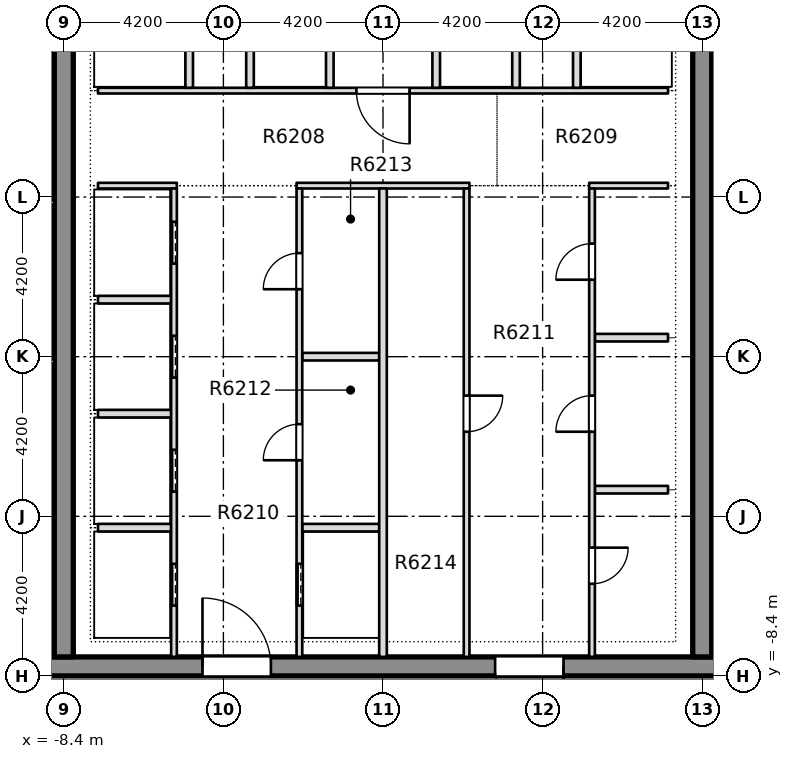
"""IFC4 building model, lengths in metres.
Left out: names, types, materials, properties, quantities, classifications, styles, units other than length and angle.
Written with IfcOpenShell. Run it as: python <this file> out.ifc"""

import sys

from ifc_helpers import new_model, si_unit, direction, frame, frame_2d, origin, place, context, subcontext, project, spatial, rectangle, extrude, element, fill, save


model = new_model("IFC4")
c1 = context("Model", 3, precision=1e-05, world=origin(), true_north=direction((0.0, 1.0)))
c2 = subcontext(c1, "Body", "Model", "MODEL_VIEW")
j1 = project(units=[si_unit("LENGTHUNIT", "METRE"), si_unit("PLANEANGLEUNIT", "RADIAN")], contexts=[c1])
p1 = place(None, origin())
s1 = spatial("IfcSite", under=j1, at=p1, CompositionType="ELEMENT")
p2 = place(p1, origin())
s2 = spatial("IfcBuilding", under=s1, at=p2, CompositionType="ELEMENT")
p3 = place(p2, frame((0.0, 0.0, 237.25)))
s3 = spatial("IfcBuildingStorey", under=s2, at=p3, CompositionType="ELEMENT", Elevation=237.25)
p4 = place(p3, frame((-12.1, -8.15, -0.4), z_axis=(0.0, 0.0, 1.0), x_axis=(1.0, 0.0, 0.0)))
e1 = element("IfcWall", 1, at=p4, inside=s3, PredefinedType="SHEAR", context=c2, shape_type="SweptSolid", body=[
    extrude(rectangle(XDim=24.2, YDim=0.5, at=frame_2d((12.1, 0.0))), origin(), (0.0, 0.0, 1.0), 3.45),
])
p5 = place(p4, frame((7.35, 0.0, 0.4)))
e2 = element("IfcOpeningElement", 2, at=p5, cuts=e1, PredefinedType="OPENING", context=c2, shape_type="SweptSolid", body=[
    extrude(rectangle(XDim=1.8, YDim=2.1, at=frame_2d((0.9, 1.05))), frame((0.0, 0.26, 0.0), z_axis=(0.0, -1.0, 0.0), x_axis=(1.0, 0.0, 0.0)), (0.0, 0.0, 1.0), 0.52),
])
p6 = place(p4, frame((15.05, 0.0, 0.4)))
e3 = element("IfcOpeningElement", 3, at=p6, cuts=e1, PredefinedType="OPENING", context=c2, shape_type="SweptSolid", body=[
    extrude(rectangle(XDim=1.8, YDim=2.1, at=frame_2d((0.9, 1.05))), frame((0.0, 0.26, 0.0), z_axis=(0.0, -1.0, 0.0), x_axis=(1.0, 0.0, 0.0)), (0.0, 0.0, 1.0), 0.52),
])
p7 = place(p3, frame((-8.4, -7.9, -0.4), z_axis=(0.0, 0.0, 1.0), x_axis=(0.0, 1.0, 0.0)))
e4 = element("IfcWall", 4, at=p7, inside=s3, PredefinedType="SHEAR", context=c2, shape_type="SweptSolid", body=[
    extrude(rectangle(XDim=29.15, YDim=0.5, at=frame_2d((14.575, 0.0))), origin(), (0.0, 0.0, 1.0), 3.45),
])
p8 = place(p7, frame((18.8, 0.0, 0.4)))
e5 = element("IfcOpeningElement", 5, at=p8, cuts=e4, PredefinedType="OPENING", context=c2, shape_type="SweptSolid", body=[
    extrude(rectangle(XDim=1.2, YDim=2.1, at=frame_2d((0.6, 1.05))), frame((0.0, 0.26, 0.0), z_axis=(0.0, -1.0, 0.0), x_axis=(1.0, 0.0, 0.0)), (0.0, 0.0, 1.0), 0.52),
])
p9 = place(p3, frame((8.4, -7.9, -0.4), z_axis=(0.0, 0.0, 1.0), x_axis=(0.0, 1.0, 0.0)))
e6 = element("IfcWall", 6, at=p9, inside=s3, PredefinedType="SHEAR", context=c2, shape_type="SweptSolid", body=[
    extrude(rectangle(XDim=29.15, YDim=0.5, at=frame_2d((14.575, 0.0))), origin(), (0.0, 0.0, 1.0), 3.45),
])
p10 = place(p9, frame((18.8, 0.0, 0.4)))
e7 = element("IfcOpeningElement", 7, at=p10, cuts=e6, PredefinedType="OPENING", context=c2, shape_type="SweptSolid", body=[
    extrude(rectangle(XDim=1.2, YDim=2.1, at=frame_2d((0.6, 1.05))), frame((0.0, 0.26, 0.0), z_axis=(0.0, -1.0, 0.0), x_axis=(1.0, 0.0, 0.0)), (0.0, 0.0, 1.0), 0.52),
])
p11 = place(p3, frame((-7.5, -4.5, 0.0), z_axis=(0.0, 0.0, 1.0), x_axis=(1.0, 0.0, 0.0)))
e8 = element("IfcWall", 8, at=p11, inside=s3, PredefinedType="PARTITIONING", context=c2, shape_type="SweptSolid", body=[
    extrude(rectangle(XDim=1.925, YDim=0.2, at=frame_2d((0.962, 0.0))), origin(), (0.0, 0.0, 1.0), 3.05),
])
p12 = place(p3, frame((-2.125, -4.5, 0.0), z_axis=(0.0, 0.0, 1.0), x_axis=(1.0, 0.0, 0.0)))
e9 = element("IfcWall", 9, at=p12, inside=s3, PredefinedType="PARTITIONING", context=c2, shape_type="SweptSolid", body=[
    extrude(rectangle(XDim=2.025, YDim=0.2, at=frame_2d((1.012, 0.0))), origin(), (0.0, 0.0, 1.0), 3.05),
])
for number, where, z_axis, x_axis in (
    (10, (5.575, -3.5, 0.0), (0.0, 0.0, 1.0), (1.0, 0.0, 0.0)),
    (11, (-7.5, -1.5, 0.0), (0.0, 0.0, 1.0), (1.0, 0.0, 0.0)),
):
    element("IfcWall", number, at=place(p3, frame(where, z_axis=z_axis, x_axis=x_axis)), inside=s3, PredefinedType="PARTITIONING", context=c2, shape_type="SweptSolid", body=[
        extrude(rectangle(XDim=1.925, YDim=0.2, at=frame_2d((0.962, 0.0))), origin(), (0.0, 0.0, 1.0), 3.05),
    ])
p13 = place(p3, frame((-2.125, 0.0, 0.0), z_axis=(0.0, 0.0, 1.0), x_axis=(1.0, 0.0, 0.0)))
e12 = element("IfcWall", 12, at=p13, inside=s3, PredefinedType="PARTITIONING", context=c2, shape_type="SweptSolid", body=[
    extrude(rectangle(XDim=2.025, YDim=0.2, at=frame_2d((1.012, 0.0))), origin(), (0.0, 0.0, 1.0), 3.05),
])
for number, where, z_axis, x_axis in (
    (13, (5.575, 0.5, 0.0), (0.0, 0.0, 1.0), (1.0, 0.0, 0.0)),
    (14, (-7.5, 1.5, 0.0), (0.0, 0.0, 1.0), (1.0, 0.0, 0.0)),
):
    element("IfcWall", number, at=place(p3, frame(where, z_axis=z_axis, x_axis=x_axis)), inside=s3, PredefinedType="PARTITIONING", context=c2, shape_type="SweptSolid", body=[
        extrude(rectangle(XDim=1.925, YDim=0.2, at=frame_2d((0.962, 0.0))), origin(), (0.0, 0.0, 1.0), 3.05),
    ])
p14 = place(p3, frame((-7.5, 4.5, 0.0), z_axis=(0.0, 0.0, 1.0), x_axis=(1.0, 0.0, 0.0)))
e15 = element("IfcWall", 15, at=p14, inside=s3, PredefinedType="PARTITIONING", context=c2, shape_type="SweptSolid", body=[
    extrude(rectangle(XDim=2.075, YDim=0.15, at=frame_2d((1.038, 0.0))), origin(), (0.0, 0.0, 1.0), 3.05),
])
p15 = place(p3, frame((-2.275, 4.5, 0.0), z_axis=(0.0, 0.0, 1.0), x_axis=(1.0, 0.0, 0.0)))
e16 = element("IfcWall", 16, at=p15, inside=s3, PredefinedType="PARTITIONING", context=c2, shape_type="SweptSolid", body=[
    extrude(rectangle(XDim=4.55, YDim=0.15, at=frame_2d((2.275, 0.0))), origin(), (0.0, 0.0, 1.0), 3.05),
])
p16 = place(p3, frame((5.425, 4.5, 0.0), z_axis=(0.0, 0.0, 1.0), x_axis=(1.0, 0.0, 0.0)))
e17 = element("IfcWall", 17, at=p16, inside=s3, PredefinedType="PARTITIONING", context=c2, shape_type="SweptSolid", body=[
    extrude(rectangle(XDim=2.075, YDim=0.15, at=frame_2d((1.038, 0.0))), origin(), (0.0, 0.0, 1.0), 3.05),
])
p17 = place(p3, frame((-7.5, 7.0, 0.0), z_axis=(0.0, 0.0, 1.0), x_axis=(1.0, 0.0, 0.0)))
e18 = element("IfcWall", 18, at=p17, inside=s3, PredefinedType="PARTITIONING", context=c2, shape_type="SweptSolid", body=[
    extrude(rectangle(XDim=15.0, YDim=0.15, at=frame_2d((7.5, 0.0))), origin(), (0.0, 0.0, 1.0), 3.05),
])
p18 = place(p17, frame((6.8, 0.0, 0.0)))
e19 = element("IfcOpeningElement", 19, at=p18, cuts=e18, PredefinedType="OPENING", context=c2, shape_type="SweptSolid", body=[
    extrude(rectangle(XDim=1.4, YDim=2.1, at=frame_2d((0.7, 1.05))), frame((0.0, 0.085, 0.0), z_axis=(0.0, -1.0, 0.0), x_axis=(1.0, 0.0, 0.0)), (0.0, 0.0, 1.0), 0.17),
])
p19 = place(p3, frame((-5.5, -7.899, 0.0), z_axis=(0.0, 0.0, 1.0), x_axis=(0.0, 1.0, 0.0)))
e20 = element("IfcWall", 20, at=p19, inside=s3, PredefinedType="PARTITIONING", context=c2, shape_type="SweptSolid", body=[
    extrude(rectangle(XDim=12.324, YDim=0.15, at=frame_2d((6.162, 0.0))), origin(), (0.0, 0.0, 1.0), 3.05),
])
p20 = place(p19, frame((1.349, 0.0, 0.0)))
e21 = element("IfcOpeningElement", 21, at=p20, cuts=e20, PredefinedType="OPENING", context=c2, shape_type="SweptSolid", body=[
    extrude(rectangle(XDim=1.1, YDim=2.1, at=frame_2d((0.55, 1.05))), frame((0.0, 0.085, 0.0), z_axis=(0.0, -1.0, 0.0), x_axis=(1.0, 0.0, 0.0)), (0.0, 0.0, 1.0), 0.17),
])
p21 = place(p19, frame((4.349, 0.0, 0.0)))
e22 = element("IfcOpeningElement", 22, at=p21, cuts=e20, PredefinedType="OPENING", context=c2, shape_type="SweptSolid", body=[
    extrude(rectangle(XDim=1.1, YDim=2.1, at=frame_2d((0.55, 1.05))), frame((0.0, 0.085, 0.0), z_axis=(0.0, -1.0, 0.0), x_axis=(1.0, 0.0, 0.0)), (0.0, 0.0, 1.0), 0.17),
])
p22 = place(p19, frame((7.349, 0.0, 0.0)))
e23 = element("IfcOpeningElement", 23, at=p22, cuts=e20, PredefinedType="OPENING", context=c2, shape_type="SweptSolid", body=[
    extrude(rectangle(XDim=1.1, YDim=2.1, at=frame_2d((0.55, 1.05))), frame((0.0, 0.085, 0.0), z_axis=(0.0, -1.0, 0.0), x_axis=(1.0, 0.0, 0.0)), (0.0, 0.0, 1.0), 0.17),
])
p23 = place(p19, frame((10.349, 0.0, 0.0)))
e24 = element("IfcOpeningElement", 24, at=p23, cuts=e20, PredefinedType="OPENING", context=c2, shape_type="SweptSolid", body=[
    extrude(rectangle(XDim=1.1, YDim=2.1, at=frame_2d((0.55, 1.05))), frame((0.0, 0.085, 0.0), z_axis=(0.0, -1.0, 0.0), x_axis=(1.0, 0.0, 0.0)), (0.0, 0.0, 1.0), 0.17),
])
p24 = place(p3, frame((-5.1, 7.075, 0.0), z_axis=(0.0, 0.0, 1.0), x_axis=(0.0, 1.0, 0.0)))
e25 = element("IfcWall", 25, at=p24, inside=s3, PredefinedType="PARTITIONING", context=c2, shape_type="SweptSolid", body=[
    extrude(rectangle(XDim=2.725, YDim=0.2, at=frame_2d((1.363, 0.0))), origin(), (0.0, 0.0, 1.0), 3.05),
])
p25 = place(p3, frame((-3.5, 7.075, 0.0), z_axis=(0.0, 0.0, 1.0), x_axis=(0.0, 1.0, 0.0)))
e26 = element("IfcWall", 26, at=p25, inside=s3, PredefinedType="PARTITIONING", context=c2, shape_type="SweptSolid", body=[
    extrude(rectangle(XDim=2.85, YDim=0.2, at=frame_2d((1.425, 0.0))), origin(), (0.0, 0.0, 1.0), 3.05),
])
p26 = place(p3, frame((-2.2, -7.899, 0.0), z_axis=(0.0, 0.0, 1.0), x_axis=(0.0, 1.0, 0.0)))
e27 = element("IfcWall", 27, at=p26, inside=s3, PredefinedType="PARTITIONING", context=c2, shape_type="SweptSolid", body=[
    extrude(rectangle(XDim=12.324, YDim=0.15, at=frame_2d((6.162, 0.0))), origin(), (0.0, 0.0, 1.0), 3.05),
])
p27 = place(p26, frame((1.349, 0.0, 0.0)))
e28 = element("IfcOpeningElement", 28, at=p27, cuts=e27, PredefinedType="OPENING", context=c2, shape_type="SweptSolid", body=[
    extrude(rectangle(XDim=1.1, YDim=2.1, at=frame_2d((0.55, 1.05))), frame((0.0, 0.085, 0.0), z_axis=(0.0, -1.0, 0.0), x_axis=(1.0, 0.0, 0.0)), (0.0, 0.0, 1.0), 0.17),
])
p28 = place(p26, frame((5.174, 0.0, 0.0)))
e29 = element("IfcOpeningElement", 29, at=p28, cuts=e27, PredefinedType="OPENING", context=c2, shape_type="SweptSolid", body=[
    extrude(rectangle(XDim=0.95, YDim=2.1, at=frame_2d((0.475, 1.05))), frame((0.0, 0.085, 0.0), z_axis=(0.0, -1.0, 0.0), x_axis=(1.0, 0.0, 0.0)), (0.0, 0.0, 1.0), 0.17),
])
p29 = place(p26, frame((9.674, 0.0, 0.0)))
e30 = element("IfcOpeningElement", 30, at=p29, cuts=e27, PredefinedType="OPENING", context=c2, shape_type="SweptSolid", body=[
    extrude(rectangle(XDim=0.95, YDim=2.1, at=frame_2d((0.475, 1.05))), frame((0.0, 0.085, 0.0), z_axis=(0.0, -1.0, 0.0), x_axis=(1.0, 0.0, 0.0)), (0.0, 0.0, 1.0), 0.17),
])
p30 = place(p3, frame((-1.4, 7.075, 0.0), z_axis=(0.0, 0.0, 1.0), x_axis=(0.0, 1.0, 0.0)))
e31 = element("IfcWall", 31, at=p30, inside=s3, PredefinedType="PARTITIONING", context=c2, shape_type="SweptSolid", body=[
    extrude(rectangle(XDim=2.85, YDim=0.2, at=frame_2d((1.425, 0.0))), origin(), (0.0, 0.0, 1.0), 3.05),
])
p31 = place(p3, frame((0.0, -7.899, 0.0), z_axis=(0.0, 0.0, 1.0), x_axis=(0.0, 1.0, 0.0)))
e32 = element("IfcWall", 32, at=p31, inside=s3, PredefinedType="PARTITIONING", context=c2, shape_type="SweptSolid", body=[
    extrude(rectangle(XDim=12.324, YDim=0.2, at=frame_2d((6.162, 0.0))), origin(), (0.0, 0.0, 1.0), 3.05),
])
p32 = place(p3, frame((1.4, 7.075, 0.0), z_axis=(0.0, 0.0, 1.0), x_axis=(0.0, 1.0, 0.0)))
e33 = element("IfcWall", 33, at=p32, inside=s3, PredefinedType="PARTITIONING", context=c2, shape_type="SweptSolid", body=[
    extrude(rectangle(XDim=2.85, YDim=0.2, at=frame_2d((1.425, 0.0))), origin(), (0.0, 0.0, 1.0), 3.05),
])
p33 = place(p3, frame((2.2, -7.899, 0.0), z_axis=(0.0, 0.0, 1.0), x_axis=(0.0, 1.0, 0.0)))
e34 = element("IfcWall", 34, at=p33, inside=s3, PredefinedType="PARTITIONING", context=c2, shape_type="SweptSolid", body=[
    extrude(rectangle(XDim=12.324, YDim=0.15, at=frame_2d((6.162, 0.0))), origin(), (0.0, 0.0, 1.0), 3.05),
])
p34 = place(p33, frame((5.924, 0.0, 0.0)))
e35 = element("IfcOpeningElement", 35, at=p34, cuts=e34, PredefinedType="OPENING", context=c2, shape_type="SweptSolid", body=[
    extrude(rectangle(XDim=0.95, YDim=2.1, at=frame_2d((0.475, 1.05))), frame((0.0, 0.085, 0.0), z_axis=(0.0, -1.0, 0.0), x_axis=(1.0, 0.0, 0.0)), (0.0, 0.0, 1.0), 0.17),
])
p35 = place(p3, frame((3.5, 7.075, 0.0), z_axis=(0.0, 0.0, 1.0), x_axis=(0.0, 1.0, 0.0)))
e36 = element("IfcWall", 36, at=p35, inside=s3, PredefinedType="PARTITIONING", context=c2, shape_type="SweptSolid", body=[
    extrude(rectangle(XDim=2.85, YDim=0.2, at=frame_2d((1.425, 0.0))), origin(), (0.0, 0.0, 1.0), 3.05),
])
p36 = place(p3, frame((5.1, 7.075, 0.0), z_axis=(0.0, 0.0, 1.0), x_axis=(0.0, 1.0, 0.0)))
e37 = element("IfcWall", 37, at=p36, inside=s3, PredefinedType="PARTITIONING", context=c2, shape_type="SweptSolid", body=[
    extrude(rectangle(XDim=2.725, YDim=0.2, at=frame_2d((1.363, 0.0))), origin(), (0.0, 0.0, 1.0), 3.05),
])
p37 = place(p3, frame((5.5, -7.899, 0.0), z_axis=(0.0, 0.0, 1.0), x_axis=(0.0, 1.0, 0.0)))
e38 = element("IfcWall", 38, at=p37, inside=s3, PredefinedType="PARTITIONING", context=c2, shape_type="SweptSolid", body=[
    extrude(rectangle(XDim=12.324, YDim=0.15, at=frame_2d((6.162, 0.0))), origin(), (0.0, 0.0, 1.0), 3.05),
])
p38 = place(p37, frame((1.924, 0.0, 0.0)))
e39 = element("IfcOpeningElement", 39, at=p38, cuts=e38, PredefinedType="OPENING", context=c2, shape_type="SweptSolid", body=[
    extrude(rectangle(XDim=0.95, YDim=2.1, at=frame_2d((0.475, 1.05))), frame((0.0, 0.085, 0.0), z_axis=(0.0, -1.0, 0.0), x_axis=(1.0, 0.0, 0.0)), (0.0, 0.0, 1.0), 0.17),
])
p39 = place(p37, frame((5.924, 0.0, 0.0)))
e40 = element("IfcOpeningElement", 40, at=p39, cuts=e38, PredefinedType="OPENING", context=c2, shape_type="SweptSolid", body=[
    extrude(rectangle(XDim=0.95, YDim=2.1, at=frame_2d((0.475, 1.05))), frame((0.0, 0.085, 0.0), z_axis=(0.0, -1.0, 0.0), x_axis=(1.0, 0.0, 0.0)), (0.0, 0.0, 1.0), 0.17),
])
p40 = place(p37, frame((9.924, 0.0, 0.0)))
e41 = element("IfcOpeningElement", 41, at=p40, cuts=e38, PredefinedType="OPENING", context=c2, shape_type="SweptSolid", body=[
    extrude(rectangle(XDim=0.95, YDim=2.1, at=frame_2d((0.475, 1.05))), frame((0.0, 0.085, 0.0), z_axis=(0.0, -1.0, 0.0), x_axis=(1.0, 0.0, 0.0)), (0.0, 0.0, 1.0), 0.17),
])
for number, where, z_axis, x_axis in (
    (42, (-12.099, -0.125, 0.0), (0.0, 0.0, 1.0), (1.0, 0.0, 0.0)),
    (43, (-12.099, 4.054, 0.0), (0.0, 0.0, 1.0), (1.0, 0.0, 0.0)),
):
    element("IfcWall", number, at=place(p3, frame(where, z_axis=z_axis, x_axis=x_axis)), inside=s3, PredefinedType="PARTITIONING", context=c2, shape_type="SweptSolid", body=[
        extrude(rectangle(XDim=3.448, YDim=0.1, at=frame_2d((1.724, 0.0))), origin(), (0.0, 0.0, 1.0), 3.05),
    ])
p41 = place(p3, frame((8.651, 1.225, 0.0), z_axis=(0.0, 0.0, 1.0), x_axis=(1.0, 0.0, 0.0)))
e44 = element("IfcWall", 44, at=p41, inside=s3, PredefinedType="PARTITIONING", context=c2, shape_type="SweptSolid", body=[
    extrude(rectangle(XDim=3.448, YDim=0.2, at=frame_2d((1.724, 0.0))), origin(), (0.0, 0.0, 1.0), 3.05),
])
p42 = place(p20, origin())
e45 = element("IfcDoor", 45, at=p42, inside=s3, OperationType="SLIDING_TO_LEFT", PredefinedType="DOOR", context=c2, shape_type="SweptSolid", body=[
    extrude(rectangle(XDim=1.1, YDim=2.1, at=frame_2d((0.55, 1.05))), frame((0.0, 0.025, 0.0), z_axis=(0.0, -1.0, 0.0), x_axis=(1.0, 0.0, 0.0)), (0.0, 0.0, 1.0), 0.05),
])
fill(e21, e45)
p43 = place(p21, origin())
e46 = element("IfcDoor", 46, at=p43, inside=s3, OperationType="SLIDING_TO_LEFT", PredefinedType="DOOR", context=c2, shape_type="SweptSolid", body=[
    extrude(rectangle(XDim=1.1, YDim=2.1, at=frame_2d((0.55, 1.05))), frame((0.0, 0.025, 0.0), z_axis=(0.0, -1.0, 0.0), x_axis=(1.0, 0.0, 0.0)), (0.0, 0.0, 1.0), 0.05),
])
fill(e22, e46)
p44 = place(p22, origin())
e47 = element("IfcDoor", 47, at=p44, inside=s3, OperationType="SLIDING_TO_LEFT", PredefinedType="DOOR", context=c2, shape_type="SweptSolid", body=[
    extrude(rectangle(XDim=1.1, YDim=2.1, at=frame_2d((0.55, 1.05))), frame((0.0, 0.025, 0.0), z_axis=(0.0, -1.0, 0.0), x_axis=(1.0, 0.0, 0.0)), (0.0, 0.0, 1.0), 0.05),
])
fill(e23, e47)
p45 = place(p23, origin())
e48 = element("IfcDoor", 48, at=p45, inside=s3, OperationType="SLIDING_TO_LEFT", PredefinedType="DOOR", context=c2, shape_type="SweptSolid", body=[
    extrude(rectangle(XDim=1.1, YDim=2.1, at=frame_2d((0.55, 1.05))), frame((0.0, 0.025, 0.0), z_axis=(0.0, -1.0, 0.0), x_axis=(1.0, 0.0, 0.0)), (0.0, 0.0, 1.0), 0.05),
])
fill(e24, e48)
p46 = place(p27, origin())
e49 = element("IfcDoor", 49, at=p46, inside=s3, OperationType="SLIDING_TO_LEFT", PredefinedType="DOOR", context=c2, shape_type="SweptSolid", body=[
    extrude(rectangle(XDim=1.1, YDim=2.1, at=frame_2d((0.55, 1.05))), frame((0.0, 0.025, 0.0), z_axis=(0.0, -1.0, 0.0), x_axis=(1.0, 0.0, 0.0)), (0.0, 0.0, 1.0), 0.05),
])
fill(e28, e49)
p47 = place(p28, origin())
e50 = element("IfcDoor", 50, at=p47, inside=s3, OperationType="SINGLE_SWING_LEFT", PredefinedType="DOOR", context=c2, shape_type="SweptSolid", body=[
    extrude(rectangle(XDim=0.95, YDim=2.1, at=frame_2d((0.475, 1.05))), frame((0.0, 0.025, 0.0), z_axis=(0.0, -1.0, 0.0), x_axis=(1.0, 0.0, 0.0)), (0.0, 0.0, 1.0), 0.05),
])
fill(e29, e50)
p48 = place(p29, origin())
e51 = element("IfcDoor", 51, at=p48, inside=s3, OperationType="SINGLE_SWING_RIGHT", PredefinedType="DOOR", context=c2, shape_type="SweptSolid", body=[
    extrude(rectangle(XDim=0.95, YDim=2.1, at=frame_2d((0.475, 1.05))), frame((0.0, 0.025, 0.0), z_axis=(0.0, -1.0, 0.0), x_axis=(1.0, 0.0, 0.0)), (0.0, 0.0, 1.0), 0.05),
])
fill(e30, e51)
p49 = place(p34, origin())
e52 = element("IfcDoor", 52, at=p49, inside=s3, OperationType="SINGLE_SWING_RIGHT", PredefinedType="DOOR", context=c2, shape_type="SweptSolid", body=[
    extrude(rectangle(XDim=0.95, YDim=2.1, at=frame_2d((0.475, 1.05))), frame((0.0, 0.025, 0.0), z_axis=(0.0, -1.0, 0.0), x_axis=(1.0, 0.0, 0.0)), (0.0, 0.0, 1.0), 0.05),
])
fill(e35, e52)
p50 = place(p38, origin())
e53 = element("IfcDoor", 53, at=p50, inside=s3, OperationType="SINGLE_SWING_LEFT", PredefinedType="DOOR", context=c2, shape_type="SweptSolid", body=[
    extrude(rectangle(XDim=0.95, YDim=2.1, at=frame_2d((0.475, 1.05))), frame((0.0, 0.025, 0.0), z_axis=(0.0, -1.0, 0.0), x_axis=(1.0, 0.0, 0.0)), (0.0, 0.0, 1.0), 0.05),
])
fill(e39, e53)
p51 = place(p39, origin())
e54 = element("IfcDoor", 54, at=p51, inside=s3, OperationType="SINGLE_SWING_LEFT", PredefinedType="DOOR", context=c2, shape_type="SweptSolid", body=[
    extrude(rectangle(XDim=0.95, YDim=2.1, at=frame_2d((0.475, 1.05))), frame((0.0, 0.025, 0.0), z_axis=(0.0, -1.0, 0.0), x_axis=(1.0, 0.0, 0.0)), (0.0, 0.0, 1.0), 0.05),
])
fill(e40, e54)
p52 = place(p40, origin())
e55 = element("IfcDoor", 55, at=p52, inside=s3, OperationType="SINGLE_SWING_RIGHT", PredefinedType="DOOR", context=c2, shape_type="SweptSolid", body=[
    extrude(rectangle(XDim=0.95, YDim=2.1, at=frame_2d((0.475, 1.05))), frame((0.0, 0.025, 0.0), z_axis=(0.0, -1.0, 0.0), x_axis=(1.0, 0.0, 0.0)), (0.0, 0.0, 1.0), 0.05),
])
fill(e41, e55)
p53 = place(p18, origin())
e56 = element("IfcDoor", 56, at=p53, inside=s3, OperationType="SINGLE_SWING_RIGHT", PredefinedType="DOOR", context=c2, shape_type="SweptSolid", body=[
    extrude(rectangle(XDim=1.4, YDim=2.1, at=frame_2d((0.7, 1.05))), frame((0.0, 0.025, 0.0), z_axis=(0.0, -1.0, 0.0), x_axis=(1.0, 0.0, 0.0)), (0.0, 0.0, 1.0), 0.05),
])
fill(e19, e56)
p54 = place(p5, origin())
e57 = element("IfcDoor", 57, at=p54, inside=s3, OperationType="SINGLE_SWING_LEFT", PredefinedType="DOOR", context=c2, shape_type="SweptSolid", body=[
    extrude(rectangle(XDim=1.8, YDim=2.1, at=frame_2d((0.9, 1.05))), frame((0.0, 0.025, 0.0), z_axis=(0.0, -1.0, 0.0), x_axis=(1.0, 0.0, 0.0)), (0.0, 0.0, 1.0), 0.05),
])
fill(e2, e57)
p55 = place(p6, origin())
e58 = element("IfcDoor", 58, at=p55, inside=s3, OperationType="SINGLE_SWING_LEFT", PredefinedType="DOOR", context=c2, shape_type="SweptSolid", body=[
    extrude(rectangle(XDim=1.8, YDim=2.1, at=frame_2d((0.9, 1.05))), frame((0.0, 0.025, 0.0), z_axis=(0.0, -1.0, 0.0), x_axis=(1.0, 0.0, 0.0)), (0.0, 0.0, 1.0), 0.05),
])
fill(e3, e58)
save(model, sys.argv[1])
